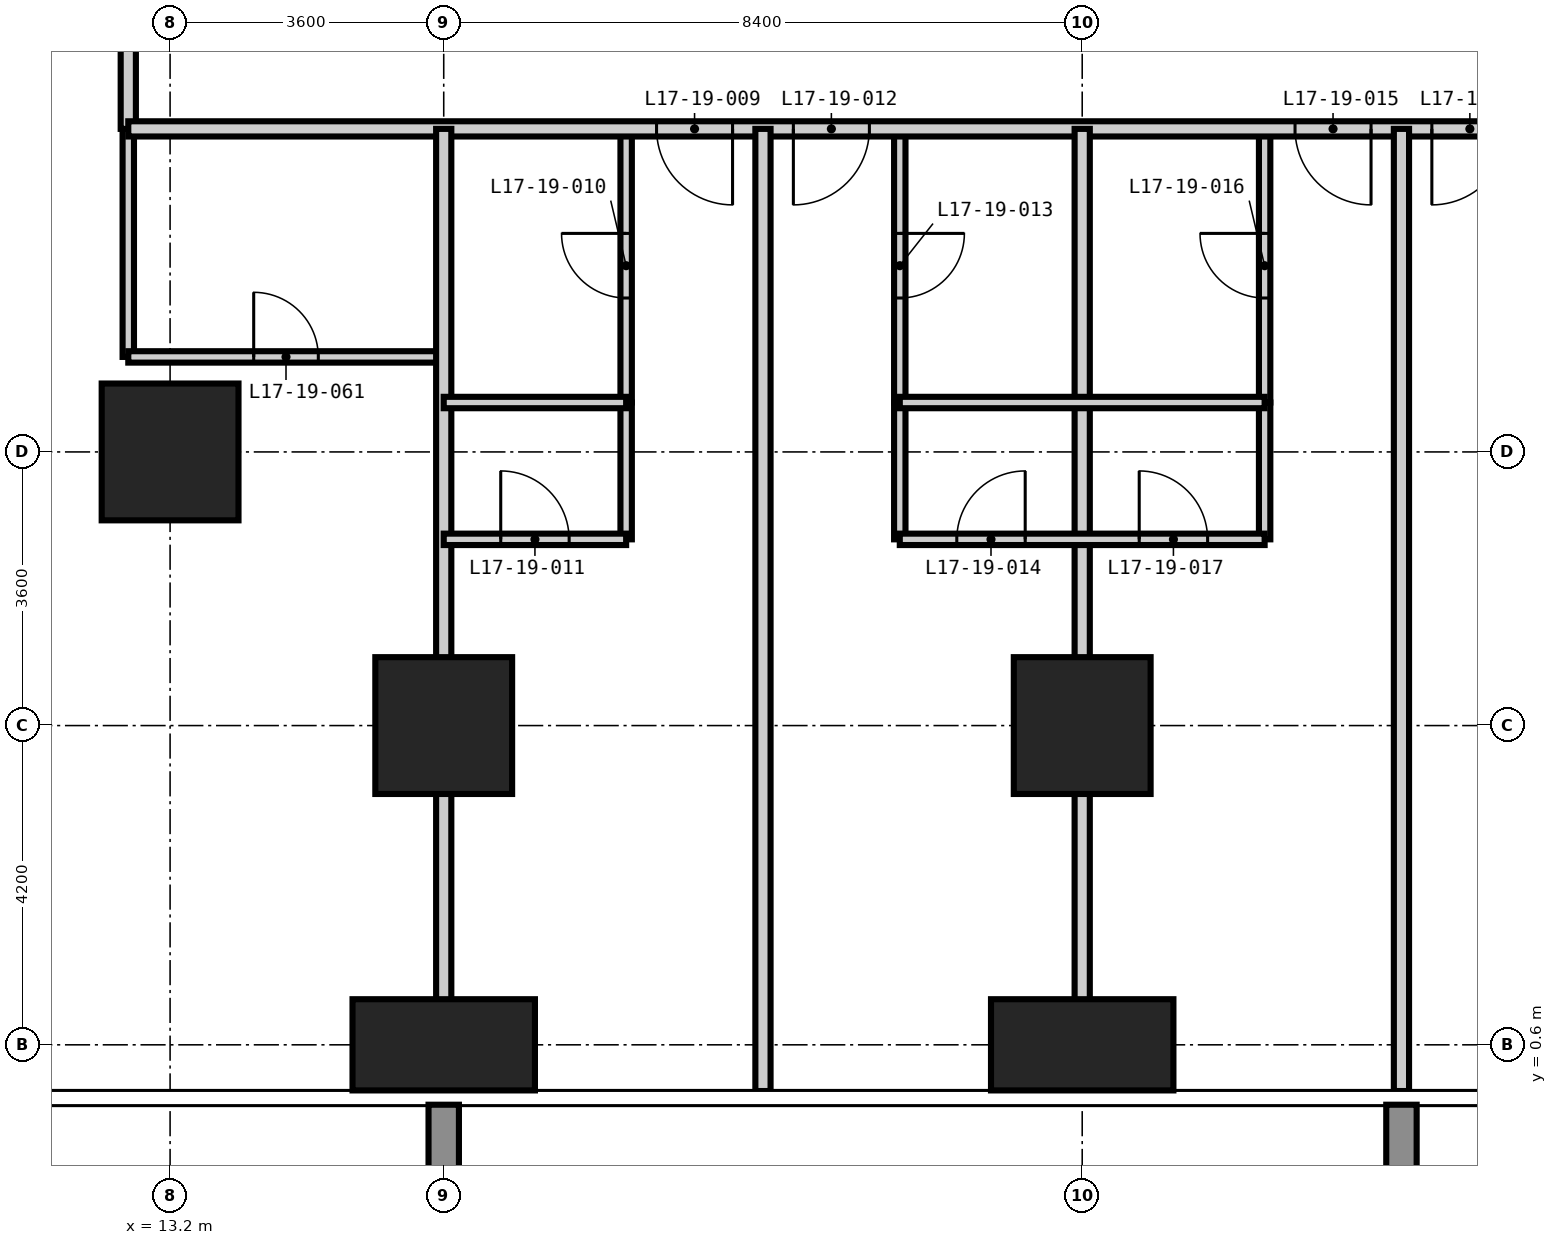
"""IFC4 building model, lengths in metres.
Left out: names, types, materials, properties, quantities, classifications, styles, units other than length and angle.
Written with IfcOpenShell. Run it as: python <this file> out.ifc"""

import sys

from ifc_helpers import new_model, si_unit, direction, frame, frame_2d, origin, origin_2d, place, context, subcontext, project, spatial, rectangle, extrude, element, fill, save


model = new_model("IFC4")
c1 = context("Model", 3, precision=1e-05, world=origin(), true_north=direction((0.0, 1.0)))
c2 = subcontext(c1, "Body", "Model", "MODEL_VIEW")
j1 = project(units=[si_unit("LENGTHUNIT", "METRE"), si_unit("PLANEANGLEUNIT", "RADIAN")], contexts=[c1])
p1 = place(None, origin())
s1 = spatial("IfcSite", under=j1, at=p1, CompositionType="ELEMENT")
p2 = place(p1, origin())
s2 = spatial("IfcBuilding", under=s1, at=p2, CompositionType="ELEMENT")
p3 = place(p2, frame((0.0, 0.0, 70.2)))
s3 = spatial("IfcBuildingStorey", under=s2, at=p3, CompositionType="ELEMENT", Elevation=70.2)
p4 = place(p3, frame((13.2, 8.4, -0.35), z_axis=(0.0, 0.0, 1.0), x_axis=(1.0, 0.0, 0.0)))
e1 = element("IfcColumn", 1, at=p4, inside=s3, PredefinedType="COLUMN", context=c2, shape_type="SweptSolid", body=[
    extrude(rectangle(XDim=1.8, YDim=1.8, at=origin_2d()), origin(), (0.0, 0.0, 1.0), 3.6),
])
p5 = place(p3, frame((16.8, 0.6, -0.35), z_axis=(0.0, 0.0, 1.0), x_axis=(1.0, 0.0, 0.0)))
e2 = element("IfcColumn", 2, at=p5, inside=s3, PredefinedType="COLUMN", context=c2, shape_type="SweptSolid", body=[
    extrude(rectangle(XDim=2.4, YDim=1.2, at=origin_2d()), origin(), (0.0, 0.0, 1.0), 3.6),
])
p6 = place(p3, frame((16.8, 4.8, -0.35), z_axis=(0.0, 0.0, 1.0), x_axis=(1.0, 0.0, 0.0)))
e3 = element("IfcColumn", 3, at=p6, inside=s3, PredefinedType="COLUMN", context=c2, shape_type="SweptSolid", body=[
    extrude(rectangle(XDim=1.8, YDim=1.8, at=origin_2d()), origin(), (0.0, 0.0, 1.0), 3.6),
])
p7 = place(p3, frame((25.2, 0.6, -0.35), z_axis=(0.0, 0.0, 1.0), x_axis=(1.0, 0.0, 0.0)))
e4 = element("IfcColumn", 4, at=p7, inside=s3, PredefinedType="COLUMN", context=c2, shape_type="SweptSolid", body=[
    extrude(rectangle(XDim=2.4, YDim=1.2, at=origin_2d()), origin(), (0.0, 0.0, 1.0), 3.6),
])
p8 = place(p3, frame((25.2, 4.8, -0.35), z_axis=(0.0, 0.0, 1.0), x_axis=(1.0, 0.0, 0.0)))
e5 = element("IfcColumn", 5, at=p8, inside=s3, PredefinedType="COLUMN", context=c2, shape_type="SweptSolid", body=[
    extrude(rectangle(XDim=1.8, YDim=1.8, at=origin_2d()), origin(), (0.0, 0.0, 1.0), 3.6),
])
p9 = place(p3, frame((12.65, 9.65, 0.0), z_axis=(0.0, 0.0, 1.0), x_axis=(0.0, 1.0, 0.0)))
e6 = element("IfcWall", 6, at=p9, inside=s3, PredefinedType="PARTITIONING", context=c2, shape_type="SweptSolid", body=[
    extrude(rectangle(XDim=3.0, YDim=0.15, at=frame_2d((1.5, 0.0))), origin(), (0.0, 0.0, 1.0), 3.25),
])
p10 = place(p3, frame((19.2, 9.05, 0.0), z_axis=(0.0, 0.0, 1.0), x_axis=(0.0, 1.0, 0.0)))
e7 = element("IfcWall", 7, at=p10, inside=s3, PredefinedType="PARTITIONING", context=c2, shape_type="SweptSolid", body=[
    extrude(rectangle(XDim=3.6, YDim=0.15, at=frame_2d((1.8, 0.0))), origin(), (0.0, 0.0, 1.0), 3.25),
])
p11 = place(p10, frame((1.375, 0.0, 0.0)))
e8 = element("IfcOpeningElement", 8, at=p11, cuts=e7, PredefinedType="OPENING", context=c2, shape_type="SweptSolid", body=[
    extrude(rectangle(XDim=0.85, YDim=2.1, at=frame_2d((0.425, 1.05))), frame((0.0, 0.085, 0.0), z_axis=(0.0, -1.0, 0.0), x_axis=(1.0, 0.0, 0.0)), (0.0, 0.0, 1.0), 0.17),
])
p12 = place(p3, frame((22.8, 9.05, 0.0), z_axis=(0.0, 0.0, 1.0), x_axis=(0.0, 1.0, 0.0)))
e9 = element("IfcWall", 9, at=p12, inside=s3, PredefinedType="PARTITIONING", context=c2, shape_type="SweptSolid", body=[
    extrude(rectangle(XDim=3.6, YDim=0.15, at=frame_2d((1.8, 0.0))), origin(), (0.0, 0.0, 1.0), 3.25),
])
p13 = place(p12, frame((1.375, 0.0, 0.0)))
e10 = element("IfcOpeningElement", 10, at=p13, cuts=e9, PredefinedType="OPENING", context=c2, shape_type="SweptSolid", body=[
    extrude(rectangle(XDim=0.85, YDim=2.1, at=frame_2d((0.425, 1.05))), frame((0.0, 0.085, 0.0), z_axis=(0.0, -1.0, 0.0), x_axis=(1.0, 0.0, 0.0)), (0.0, 0.0, 1.0), 0.17),
])
p14 = place(p3, frame((27.6, 9.05, 0.0), z_axis=(0.0, 0.0, 1.0), x_axis=(0.0, 1.0, 0.0)))
e11 = element("IfcWall", 11, at=p14, inside=s3, PredefinedType="PARTITIONING", context=c2, shape_type="SweptSolid", body=[
    extrude(rectangle(XDim=3.6, YDim=0.15, at=frame_2d((1.8, 0.0))), origin(), (0.0, 0.0, 1.0), 3.25),
])
p15 = place(p14, frame((1.375, 0.0, 0.0)))
e12 = element("IfcOpeningElement", 12, at=p15, cuts=e11, PredefinedType="OPENING", context=c2, shape_type="SweptSolid", body=[
    extrude(rectangle(XDim=0.85, YDim=2.1, at=frame_2d((0.425, 1.05))), frame((0.0, 0.085, 0.0), z_axis=(0.0, -1.0, 0.0), x_axis=(1.0, 0.0, 0.0)), (0.0, 0.0, 1.0), 0.17),
])
p16 = place(p3, frame((12.65, 9.65, 0.0), z_axis=(0.0, 0.0, 1.0), x_axis=(1.0, 0.0, 0.0)))
e13 = element("IfcWall", 13, at=p16, inside=s3, PredefinedType="PARTITIONING", context=c2, shape_type="SweptSolid", body=[
    extrude(rectangle(XDim=4.15, YDim=0.15, at=frame_2d((2.075, 0.0))), origin(), (0.0, 0.0, 1.0), 3.25),
])
p17 = place(p16, frame((1.65, 0.0, 0.0)))
e14 = element("IfcOpeningElement", 14, at=p17, cuts=e13, PredefinedType="OPENING", context=c2, shape_type="SweptSolid", body=[
    extrude(rectangle(XDim=0.85, YDim=2.1, at=frame_2d((0.425, 1.05))), frame((0.0, 0.085, 0.0), z_axis=(0.0, -1.0, 0.0), x_axis=(1.0, 0.0, 0.0)), (0.0, 0.0, 1.0), 0.17),
])
p18 = place(p3, frame((12.65, 12.65, 0.0), z_axis=(0.0, 0.0, 1.0), x_axis=(0.0, 1.0, 0.0)))
e15 = element("IfcWall", 15, at=p18, inside=s3, PredefinedType="PARTITIONING", context=c2, shape_type="SweptSolid", body=[
    extrude(rectangle(XDim=32.9, YDim=0.2, at=frame_2d((16.45, 0.0))), origin(), (0.0, 0.0, 1.0), 3.25),
])
p19 = place(p18, frame((9.05, 0.0, 0.0)))
e16 = element("IfcOpeningElement", 16, at=p19, cuts=e15, PredefinedType="OPENING", context=c2, shape_type="SweptSolid", body=[
    extrude(rectangle(XDim=1.0, YDim=2.2, at=frame_2d((0.5, 1.1))), frame((0.0, 0.11, 0.0), z_axis=(0.0, -1.0, 0.0), x_axis=(1.0, 0.0, 0.0)), (0.0, 0.0, 1.0), 0.22),
])
p20 = place(p18, frame((15.05, 0.0, 0.0)))
e17 = element("IfcOpeningElement", 17, at=p20, cuts=e15, PredefinedType="OPENING", context=c2, shape_type="SweptSolid", body=[
    extrude(rectangle(XDim=1.0, YDim=2.2, at=frame_2d((0.5, 1.1))), frame((0.0, 0.11, 0.0), z_axis=(0.0, -1.0, 0.0), x_axis=(1.0, 0.0, 0.0)), (0.0, 0.0, 1.0), 0.22),
])
p21 = place(p18, frame((25.85, 0.0, 0.0)))
e18 = element("IfcOpeningElement", 18, at=p21, cuts=e15, PredefinedType="OPENING", context=c2, shape_type="SweptSolid", body=[
    extrude(rectangle(XDim=1.0, YDim=2.2, at=frame_2d((0.5, 1.1))), frame((0.0, 0.11, 0.0), z_axis=(0.0, -1.0, 0.0), x_axis=(1.0, 0.0, 0.0)), (0.0, 0.0, 1.0), 0.22),
])
p22 = place(p18, frame((1.575, 0.0, 0.0)))
e19 = element("IfcOpeningElement", 19, at=p22, cuts=e15, PredefinedType="OPENING", context=c2, shape_type="SweptSolid", body=[
    extrude(rectangle(XDim=1.0, YDim=2.2, at=frame_2d((0.5, 1.1))), frame((0.0, 0.11, 0.0), z_axis=(0.0, -1.0, 0.0), x_axis=(1.0, 0.0, 0.0)), (0.0, 0.0, 1.0), 0.22),
])
p23 = place(p18, frame((30.625, 0.0, 0.0)))
e20 = element("IfcOpeningElement", 20, at=p23, cuts=e15, PredefinedType="OPENING", context=c2, shape_type="SweptSolid", body=[
    extrude(rectangle(XDim=1.0, YDim=2.2, at=frame_2d((0.5, 1.1))), frame((0.0, 0.11, 0.0), z_axis=(0.0, -1.0, 0.0), x_axis=(1.0, 0.0, 0.0)), (0.0, 0.0, 1.0), 0.22),
])
p24 = place(p3, frame((44.95, 12.65, 0.0), z_axis=(0.0, 0.0, 1.0), x_axis=(-1.0, 0.0, 0.0)))
e21 = element("IfcWall", 21, at=p24, inside=s3, PredefinedType="PARTITIONING", context=c2, shape_type="SweptSolid", body=[
    extrude(rectangle(XDim=32.3, YDim=0.2, at=frame_2d((16.15, 0.0))), origin(), (0.0, 0.0, 1.0), 3.25),
])
p25 = place(p24, frame((24.35, 0.0, 0.0)))
e22 = element("IfcOpeningElement", 22, at=p25, cuts=e21, PredefinedType="OPENING", context=c2, shape_type="SweptSolid", body=[
    extrude(rectangle(XDim=1.0, YDim=2.2, at=frame_2d((0.5, 1.1))), frame((0.0, 0.11, 0.0), z_axis=(0.0, -1.0, 0.0), x_axis=(1.0, 0.0, 0.0)), (0.0, 0.0, 1.0), 0.22),
])
p26 = place(p24, frame((22.55, 0.0, 0.0)))
e23 = element("IfcOpeningElement", 23, at=p26, cuts=e21, PredefinedType="OPENING", context=c2, shape_type="SweptSolid", body=[
    extrude(rectangle(XDim=1.0, YDim=2.2, at=frame_2d((0.5, 1.1))), frame((0.0, 0.11, 0.0), z_axis=(0.0, -1.0, 0.0), x_axis=(1.0, 0.0, 0.0)), (0.0, 0.0, 1.0), 0.22),
])
p27 = place(p24, frame((15.95, 0.0, 0.0)))
e24 = element("IfcOpeningElement", 24, at=p27, cuts=e21, PredefinedType="OPENING", context=c2, shape_type="SweptSolid", body=[
    extrude(rectangle(XDim=1.0, YDim=2.2, at=frame_2d((0.5, 1.1))), frame((0.0, 0.11, 0.0), z_axis=(0.0, -1.0, 0.0), x_axis=(1.0, 0.0, 0.0)), (0.0, 0.0, 1.0), 0.22),
])
p28 = place(p24, frame((14.15, 0.0, 0.0)))
e25 = element("IfcOpeningElement", 25, at=p28, cuts=e21, PredefinedType="OPENING", context=c2, shape_type="SweptSolid", body=[
    extrude(rectangle(XDim=1.0, YDim=2.2, at=frame_2d((0.5, 1.1))), frame((0.0, 0.11, 0.0), z_axis=(0.0, -1.0, 0.0), x_axis=(1.0, 0.0, 0.0)), (0.0, 0.0, 1.0), 0.22),
])
p29 = place(p24, frame((7.55, 0.0, 0.0)))
e26 = element("IfcOpeningElement", 26, at=p29, cuts=e21, PredefinedType="OPENING", context=c2, shape_type="SweptSolid", body=[
    extrude(rectangle(XDim=1.0, YDim=2.2, at=frame_2d((0.5, 1.1))), frame((0.0, 0.11, 0.0), z_axis=(0.0, -1.0, 0.0), x_axis=(1.0, 0.0, 0.0)), (0.0, 0.0, 1.0), 0.22),
])
p30 = place(p24, frame((5.75, 0.0, 0.0)))
e27 = element("IfcOpeningElement", 27, at=p30, cuts=e21, PredefinedType="OPENING", context=c2, shape_type="SweptSolid", body=[
    extrude(rectangle(XDim=1.0, YDim=2.2, at=frame_2d((0.5, 1.1))), frame((0.0, 0.11, 0.0), z_axis=(0.0, -1.0, 0.0), x_axis=(1.0, 0.0, 0.0)), (0.0, 0.0, 1.0), 0.22),
])
for number, where, z_axis, x_axis in (
    (28, (16.8, -0.008, 0.0), (0.0, 0.0, 1.0), (0.0, 1.0, 0.0)),
    (29, (21.0, -0.008, 0.0), (0.0, 0.0, 1.0), (0.0, 1.0, 0.0)),
    (30, (25.2, -0.008, 0.0), (0.0, 0.0, 1.0), (0.0, 1.0, 0.0)),
    (31, (29.4, -0.008, 0.0), (0.0, 0.0, 1.0), (0.0, 1.0, 0.0)),
):
    element("IfcWall", number, at=place(p3, frame(where, z_axis=z_axis, x_axis=x_axis)), inside=s3, PredefinedType="PARTITIONING", context=c2, shape_type="SweptSolid", body=[
        extrude(rectangle(XDim=12.658, YDim=0.2, at=frame_2d((6.329, 0.0))), origin(), (0.0, 0.0, 1.0), 3.25),
    ])
for number, where, z_axis, x_axis in (
    (32, (19.2, 7.25, 0.0), (0.0, 0.0, 1.0), (0.0, 1.0, 0.0)),
    (33, (22.8, 7.25, 0.0), (0.0, 0.0, 1.0), (0.0, 1.0, 0.0)),
    (34, (27.6, 7.25, 0.0), (0.0, 0.0, 1.0), (0.0, 1.0, 0.0)),
):
    element("IfcWall", number, at=place(p3, frame(where, z_axis=z_axis, x_axis=x_axis)), inside=s3, PredefinedType="PARTITIONING", context=c2, shape_type="SweptSolid", body=[
        extrude(rectangle(XDim=1.8, YDim=0.15, at=frame_2d((0.9, 0.0))), origin(), (0.0, 0.0, 1.0), 3.25),
    ])
p31 = place(p3, frame((16.8, 7.25, 0.0), z_axis=(0.0, 0.0, 1.0), x_axis=(1.0, 0.0, 0.0)))
e35 = element("IfcWall", 35, at=p31, inside=s3, PredefinedType="PARTITIONING", context=c2, shape_type="SweptSolid", body=[
    extrude(rectangle(XDim=2.4, YDim=0.15, at=frame_2d((1.2, 0.0))), origin(), (0.0, 0.0, 1.0), 3.25),
])
p32 = place(p31, frame((0.75, 0.0, 0.0)))
e36 = element("IfcOpeningElement", 36, at=p32, cuts=e35, PredefinedType="OPENING", context=c2, shape_type="SweptSolid", body=[
    extrude(rectangle(XDim=0.9, YDim=2.1, at=frame_2d((0.45, 1.05))), frame((0.0, 0.085, 0.0), z_axis=(0.0, -1.0, 0.0), x_axis=(1.0, 0.0, 0.0)), (0.0, 0.0, 1.0), 0.17),
])
p33 = place(p3, frame((22.8, 7.25, 0.0), z_axis=(0.0, 0.0, 1.0), x_axis=(1.0, 0.0, 0.0)))
e37 = element("IfcWall", 37, at=p33, inside=s3, PredefinedType="PARTITIONING", context=c2, shape_type="SweptSolid", body=[
    extrude(rectangle(XDim=4.8, YDim=0.15, at=frame_2d((2.4, 0.0))), origin(), (0.0, 0.0, 1.0), 3.25),
])
p34 = place(p33, frame((0.75, 0.0, 0.0)))
e38 = element("IfcOpeningElement", 38, at=p34, cuts=e37, PredefinedType="OPENING", context=c2, shape_type="SweptSolid", body=[
    extrude(rectangle(XDim=0.9, YDim=2.1, at=frame_2d((0.45, 1.05))), frame((0.0, 0.085, 0.0), z_axis=(0.0, -1.0, 0.0), x_axis=(1.0, 0.0, 0.0)), (0.0, 0.0, 1.0), 0.17),
])
p35 = place(p33, frame((3.15, 0.0, 0.0)))
e39 = element("IfcOpeningElement", 39, at=p35, cuts=e37, PredefinedType="OPENING", context=c2, shape_type="SweptSolid", body=[
    extrude(rectangle(XDim=0.9, YDim=2.1, at=frame_2d((0.45, 1.05))), frame((0.0, 0.085, 0.0), z_axis=(0.0, -1.0, 0.0), x_axis=(1.0, 0.0, 0.0)), (0.0, 0.0, 1.0), 0.17),
])
p36 = place(p3, frame((16.8, 9.05, 0.0), z_axis=(0.0, 0.0, 1.0), x_axis=(1.0, 0.0, 0.0)))
e40 = element("IfcWall", 40, at=p36, inside=s3, PredefinedType="PARTITIONING", context=c2, shape_type="SweptSolid", body=[
    extrude(rectangle(XDim=2.4, YDim=0.15, at=frame_2d((1.2, 0.0))), origin(), (0.0, 0.0, 1.0), 3.25),
])
p37 = place(p3, frame((22.8, 9.05, 0.0), z_axis=(0.0, 0.0, 1.0), x_axis=(1.0, 0.0, 0.0)))
e41 = element("IfcWall", 41, at=p37, inside=s3, PredefinedType="PARTITIONING", context=c2, shape_type="SweptSolid", body=[
    extrude(rectangle(XDim=4.8, YDim=0.15, at=frame_2d((2.4, 0.0))), origin(), (0.0, 0.0, 1.0), 3.25),
])
p38 = place(p25, origin())
e42 = element("IfcDoor", 42, at=p38, inside=s3, OperationType="SINGLE_SWING_LEFT", PredefinedType="DOOR", context=c2, shape_type="SweptSolid", body=[
    extrude(rectangle(XDim=1.0, YDim=2.2, at=frame_2d((0.5, 1.1))), frame((0.0, 0.025, 0.0), z_axis=(0.0, -1.0, 0.0), x_axis=(1.0, 0.0, 0.0)), (0.0, 0.0, 1.0), 0.05),
])
fill(e22, e42)
p39 = place(p11, origin())
e43 = element("IfcDoor", 43, at=p39, inside=s3, OperationType="SINGLE_SWING_RIGHT", PredefinedType="DOOR", context=c2, shape_type="SweptSolid", body=[
    extrude(rectangle(XDim=0.85, YDim=2.1, at=frame_2d((0.425, 1.05))), frame((0.0, 0.025, 0.0), z_axis=(0.0, -1.0, 0.0), x_axis=(1.0, 0.0, 0.0)), (0.0, 0.0, 1.0), 0.05),
])
fill(e8, e43)
p40 = place(p32, origin())
e44 = element("IfcDoor", 44, at=p40, inside=s3, OperationType="SINGLE_SWING_LEFT", PredefinedType="DOOR", context=c2, shape_type="SweptSolid", body=[
    extrude(rectangle(XDim=0.9, YDim=2.1, at=frame_2d((0.45, 1.05))), frame((0.0, 0.025, 0.0), z_axis=(0.0, -1.0, 0.0), x_axis=(1.0, 0.0, 0.0)), (0.0, 0.0, 1.0), 0.05),
])
fill(e36, e44)
p41 = place(p26, origin())
e45 = element("IfcDoor", 45, at=p41, inside=s3, OperationType="SINGLE_SWING_RIGHT", PredefinedType="DOOR", context=c2, shape_type="SweptSolid", body=[
    extrude(rectangle(XDim=1.0, YDim=2.2, at=frame_2d((0.5, 1.1))), frame((0.0, 0.025, 0.0), z_axis=(0.0, -1.0, 0.0), x_axis=(1.0, 0.0, 0.0)), (0.0, 0.0, 1.0), 0.05),
])
fill(e23, e45)
p42 = place(p13, frame((0.85, 0.0, 0.0), z_axis=(0.0, 0.0, 1.0), x_axis=(-1.0, 0.0, 0.0)))
e46 = element("IfcDoor", 46, at=p42, inside=s3, OperationType="SINGLE_SWING_LEFT", PredefinedType="DOOR", context=c2, shape_type="SweptSolid", body=[
    extrude(rectangle(XDim=0.85, YDim=2.1, at=frame_2d((0.425, 1.05))), frame((0.0, 0.025, 0.0), z_axis=(0.0, -1.0, 0.0), x_axis=(1.0, 0.0, 0.0)), (0.0, 0.0, 1.0), 0.05),
])
fill(e10, e46)
p43 = place(p34, origin())
e47 = element("IfcDoor", 47, at=p43, inside=s3, OperationType="SINGLE_SWING_RIGHT", PredefinedType="DOOR", context=c2, shape_type="SweptSolid", body=[
    extrude(rectangle(XDim=0.9, YDim=2.1, at=frame_2d((0.45, 1.05))), frame((0.0, 0.025, 0.0), z_axis=(0.0, -1.0, 0.0), x_axis=(1.0, 0.0, 0.0)), (0.0, 0.0, 1.0), 0.05),
])
fill(e38, e47)
p44 = place(p27, origin())
e48 = element("IfcDoor", 48, at=p44, inside=s3, OperationType="SINGLE_SWING_LEFT", PredefinedType="DOOR", context=c2, shape_type="SweptSolid", body=[
    extrude(rectangle(XDim=1.0, YDim=2.2, at=frame_2d((0.5, 1.1))), frame((0.0, 0.025, 0.0), z_axis=(0.0, -1.0, 0.0), x_axis=(1.0, 0.0, 0.0)), (0.0, 0.0, 1.0), 0.05),
])
fill(e24, e48)
p45 = place(p15, origin())
e49 = element("IfcDoor", 49, at=p45, inside=s3, OperationType="SINGLE_SWING_RIGHT", PredefinedType="DOOR", context=c2, shape_type="SweptSolid", body=[
    extrude(rectangle(XDim=0.85, YDim=2.1, at=frame_2d((0.425, 1.05))), frame((0.0, 0.025, 0.0), z_axis=(0.0, -1.0, 0.0), x_axis=(1.0, 0.0, 0.0)), (0.0, 0.0, 1.0), 0.05),
])
fill(e12, e49)
p46 = place(p35, origin())
e50 = element("IfcDoor", 50, at=p46, inside=s3, OperationType="SINGLE_SWING_LEFT", PredefinedType="DOOR", context=c2, shape_type="SweptSolid", body=[
    extrude(rectangle(XDim=0.9, YDim=2.1, at=frame_2d((0.45, 1.05))), frame((0.0, 0.025, 0.0), z_axis=(0.0, -1.0, 0.0), x_axis=(1.0, 0.0, 0.0)), (0.0, 0.0, 1.0), 0.05),
])
fill(e39, e50)
p47 = place(p28, origin())
e51 = element("IfcDoor", 51, at=p47, inside=s3, OperationType="SINGLE_SWING_RIGHT", PredefinedType="DOOR", context=c2, shape_type="SweptSolid", body=[
    extrude(rectangle(XDim=1.0, YDim=2.2, at=frame_2d((0.5, 1.1))), frame((0.0, 0.025, 0.0), z_axis=(0.0, -1.0, 0.0), x_axis=(1.0, 0.0, 0.0)), (0.0, 0.0, 1.0), 0.05),
])
fill(e25, e51)
p48 = place(p17, origin())
e52 = element("IfcDoor", 52, at=p48, inside=s3, OperationType="SINGLE_SWING_LEFT", PredefinedType="DOOR", context=c2, shape_type="SweptSolid", body=[
    extrude(rectangle(XDim=0.85, YDim=2.1, at=frame_2d((0.425, 1.05))), frame((0.0, 0.025, 0.0), z_axis=(0.0, -1.0, 0.0), x_axis=(1.0, 0.0, 0.0)), (0.0, 0.0, 1.0), 0.05),
])
fill(e14, e52)
save(model, sys.argv[1])
